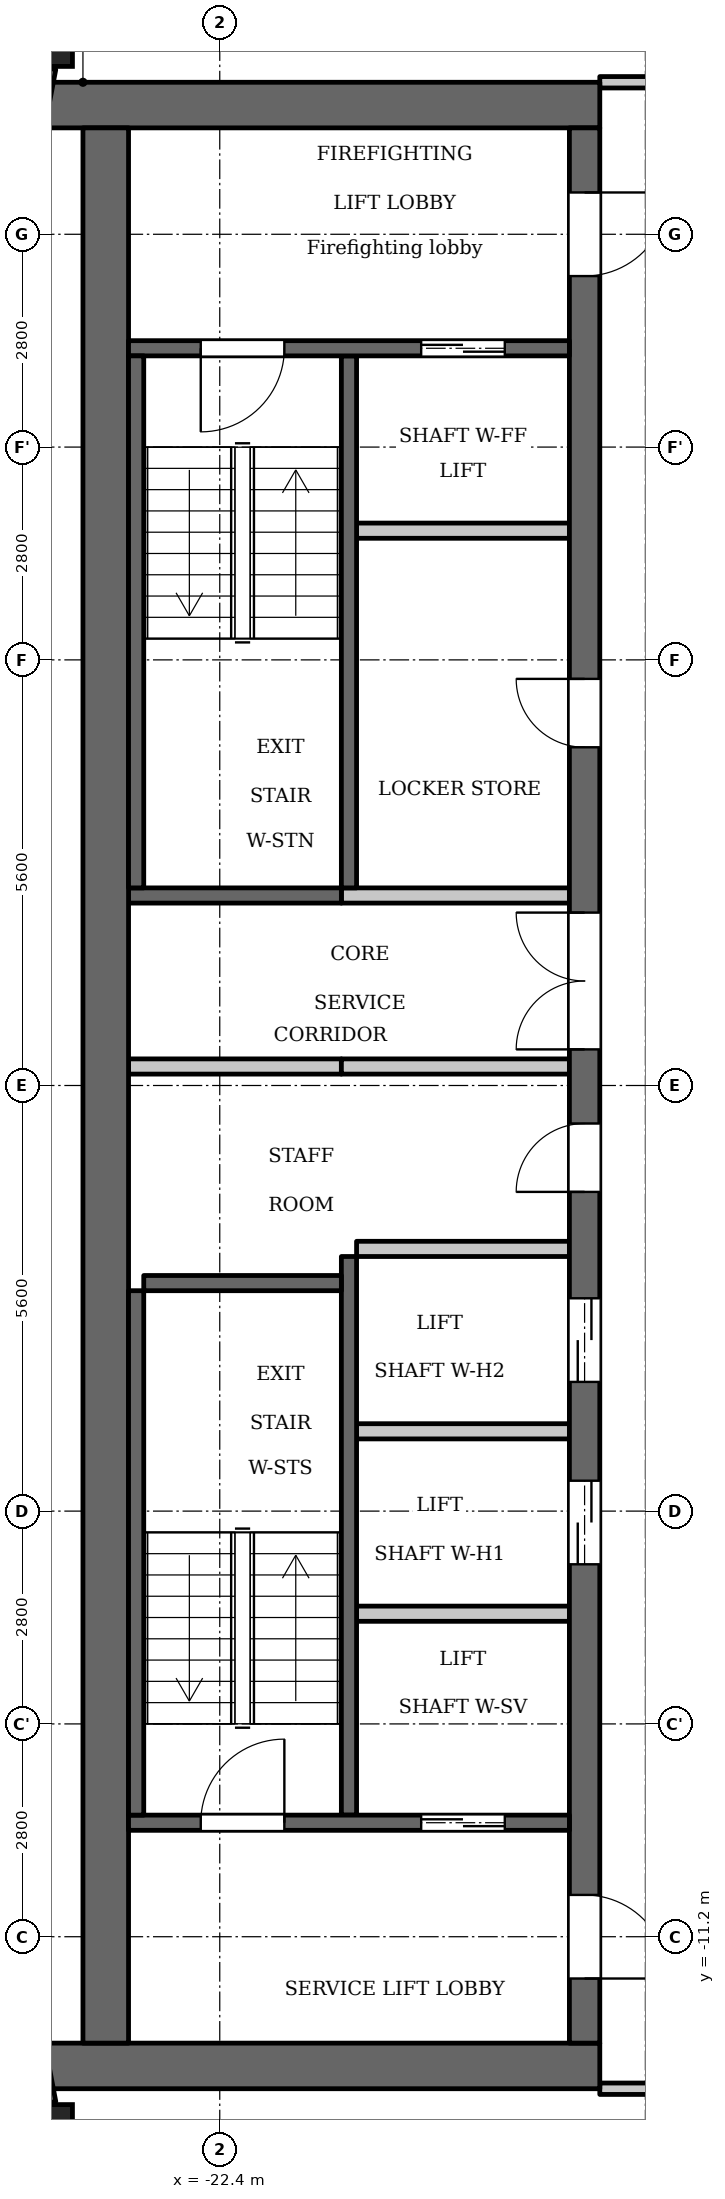
"""IFC4 building model, lengths in metres.
Left out: names, types, materials, properties, quantities, classifications, styles, units other than length and angle.
Written with IfcOpenShell. Run it as: python <this file> out.ifc"""

import sys

from ifc_helpers import new_model, si_unit, direction, frame, frame_2d, origin, origin_2d, place, context, subcontext, project, spatial, rectangle, extrude, element, fill, save


model = new_model("IFC4")
c1 = context("Model", 3, precision=1e-05, world=origin(), true_north=direction((0.0, 1.0)))
c2 = subcontext(c1, "Body", "Model", "MODEL_VIEW")
j1 = project(units=[si_unit("LENGTHUNIT", "METRE"), si_unit("PLANEANGLEUNIT", "RADIAN")], contexts=[c1])
p1 = place(None, origin())
s1 = spatial("IfcSite", under=j1, at=p1, CompositionType="ELEMENT")
p2 = place(p1, origin())
s2 = spatial("IfcBuilding", under=s1, at=p2, CompositionType="ELEMENT")
p3 = place(p2, frame((0.0, 0.0, 259.2)))
s3 = spatial("IfcBuildingStorey", under=s2, at=p3, CompositionType="ELEMENT", Elevation=259.2)
for number, where, z_axis, x_axis in (
    (1, (-24.738, 13.809, 0.0), (0.0, 0.0, 1.0), (1.0, 0.0, 0.0)),
    (2, (-24.738, -13.809, 0.0), (0.0, 0.0, 1.0), (1.0, 0.0, 0.0)),
):
    element("IfcColumn", number, at=place(p3, frame(where, z_axis=z_axis, x_axis=x_axis)), inside=s3, PredefinedType="COLUMN", context=c2, shape_type="SweptSolid", body=[
        extrude(rectangle(XDim=0.8, YDim=0.8, at=origin_2d()), origin(), (0.0, 0.0, 1.0), 3.5),
    ])
for number, where, z_axis, x_axis in (
    (3, (-24.705, 13.395, 0.0), (0.0, 0.0, 1.0), (-0.187, -0.982, 0.0)),
    (4, (-25.053, -11.572, 0.0), (0.0, 0.0, 1.0), (0.187, -0.982, 0.0)),
):
    element("IfcWall", number, at=place(p3, frame(where, z_axis=z_axis, x_axis=x_axis)), inside=s3, PredefinedType="SOLIDWALL", context=c2, shape_type="SweptSolid", body=[
        extrude(rectangle(XDim=1.856, YDim=0.3, at=frame_2d((0.928, 0.0))), origin(), (0.0, 0.0, 1.0), 2.55),
    ])
p4 = place(p3, frame((-20.7, 2.6, 0.0), z_axis=(0.0, 0.0, 1.0), x_axis=(0.0, 1.0, 0.0)))
e5 = element("IfcWall", 5, at=p4, inside=s3, PredefinedType="SHEAR", context=c2, shape_type="SweptSolid", body=[
    extrude(rectangle(XDim=7.0, YDim=0.2, at=frame_2d((3.5, 0.0))), origin(), (0.0, 0.0, 1.0), 3.2),
])
p5 = place(p3, frame((-20.7, -9.6, 0.0), z_axis=(0.0, 0.0, 1.0), x_axis=(0.0, 1.0, 0.0)))
e6 = element("IfcWall", 6, at=p5, inside=s3, PredefinedType="SHEAR", context=c2, shape_type="SweptSolid", body=[
    extrude(rectangle(XDim=7.35, YDim=0.2, at=frame_2d((3.675, 0.0))), origin(), (0.0, 0.0, 1.0), 3.2),
])
p6 = place(p3, frame((-20.8, 2.5, 0.0), z_axis=(0.0, 0.0, 1.0), x_axis=(-1.0, 0.0, 0.0)))
e7 = element("IfcWall", 7, at=p6, inside=s3, PredefinedType="SHEAR", context=c2, shape_type="SweptSolid", body=[
    extrude(rectangle(XDim=2.8, YDim=0.2, at=frame_2d((1.4, 0.0))), origin(), (0.0, 0.0, 1.0), 3.2),
])
p7 = place(p3, frame((-20.8, 0.25, 0.0), z_axis=(0.0, 0.0, 1.0), x_axis=(-1.0, 0.0, 0.0)))
e8 = element("IfcWall", 8, at=p7, inside=s3, PredefinedType="PARTITIONING", context=c2, shape_type="SweptSolid", body=[
    extrude(rectangle(XDim=2.8, YDim=0.2, at=frame_2d((1.4, 0.0))), origin(), (0.0, 0.0, 1.0), 3.2),
])
for number, where, z_axis, x_axis in (
    (9, (-17.4, 12.9, 0.0), (0.0, 0.0, 1.0), (-1.0, 0.0, 0.0)),
    (10, (-17.4, -12.9, 0.0), (0.0, 0.0, 1.0), (-1.0, 0.0, 0.0)),
):
    element("IfcWall", number, at=place(p3, frame(where, z_axis=z_axis, x_axis=x_axis)), inside=s3, PredefinedType="SHEAR", context=c2, shape_type="SweptSolid", body=[
        extrude(rectangle(XDim=7.32, YDim=0.6, at=frame_2d((3.66, 0.0))), origin(), (0.0, 0.0, 1.0), 3.2),
    ])
p8 = place(p3, frame((-17.6, -12.6, 0.0), z_axis=(0.0, 0.0, 1.0), x_axis=(0.0, 1.0, 0.0)))
e11 = element("IfcWall", 11, at=p8, inside=s3, PredefinedType="SHEAR", context=c2, shape_type="SweptSolid", body=[
    extrude(rectangle(XDim=25.2, YDim=0.4, at=frame_2d((12.6, 0.0))), origin(), (0.0, 0.0, 1.0), 3.2),
])
p9 = place(p8, frame((6.3, 0.0, 0.0)))
e12 = element("IfcOpeningElement", 12, at=p9, cuts=e11, PredefinedType="OPENING", context=c2, shape_type="SweptSolid", body=[
    extrude(rectangle(XDim=1.1, YDim=2.1, at=frame_2d((0.55, 1.05))), frame((0.0, 0.21, 0.0), z_axis=(0.0, -1.0, 0.0), x_axis=(1.0, 0.0, 0.0)), (0.0, 0.0, 1.0), 0.42),
])
p10 = place(p8, frame((8.7, 0.0, 0.0)))
e13 = element("IfcOpeningElement", 13, at=p10, cuts=e11, PredefinedType="OPENING", context=c2, shape_type="SweptSolid", body=[
    extrude(rectangle(XDim=1.1, YDim=2.1, at=frame_2d((0.55, 1.05))), frame((0.0, 0.21, 0.0), z_axis=(0.0, -1.0, 0.0), x_axis=(1.0, 0.0, 0.0)), (0.0, 0.0, 1.0), 0.42),
])
p11 = place(p8, frame((11.2, 0.0, 0.0)))
e14 = element("IfcOpeningElement", 14, at=p11, cuts=e11, PredefinedType="OPENING", context=c2, shape_type="SweptSolid", body=[
    extrude(rectangle(XDim=0.9, YDim=2.1, at=frame_2d((0.45, 1.05))), frame((0.0, 0.21, 0.0), z_axis=(0.0, -1.0, 0.0), x_axis=(1.0, 0.0, 0.0)), (0.0, 0.0, 1.0), 0.42),
])
p12 = place(p8, frame((17.05, 0.0, 0.0)))
e15 = element("IfcOpeningElement", 15, at=p12, cuts=e11, PredefinedType="OPENING", context=c2, shape_type="SweptSolid", body=[
    extrude(rectangle(XDim=0.9, YDim=2.1, at=frame_2d((0.45, 1.05))), frame((0.0, 0.21, 0.0), z_axis=(0.0, -1.0, 0.0), x_axis=(1.0, 0.0, 0.0)), (0.0, 0.0, 1.0), 0.42),
])
p13 = place(p8, frame((23.25, 0.0, 0.0)))
e16 = element("IfcOpeningElement", 16, at=p13, cuts=e11, PredefinedType="OPENING", context=c2, shape_type="SweptSolid", body=[
    extrude(rectangle(XDim=1.1, YDim=2.1, at=frame_2d((0.55, 1.05))), frame((0.0, 0.21, 0.0), z_axis=(0.0, -1.0, 0.0), x_axis=(1.0, 0.0, 0.0)), (0.0, 0.0, 1.0), 0.42),
])
p14 = place(p8, frame((0.85, 0.0, 0.0)))
e17 = element("IfcOpeningElement", 17, at=p14, cuts=e11, PredefinedType="OPENING", context=c2, shape_type="SweptSolid", body=[
    extrude(rectangle(XDim=1.1, YDim=2.1, at=frame_2d((0.55, 1.05))), frame((0.0, 0.21, 0.0), z_axis=(0.0, -1.0, 0.0), x_axis=(1.0, 0.0, 0.0)), (0.0, 0.0, 1.0), 0.42),
])
p15 = place(p8, frame((13.075, 0.0, 0.0)))
e18 = element("IfcOpeningElement", 18, at=p15, cuts=e11, PredefinedType="OPENING", context=c2, shape_type="SweptSolid", body=[
    extrude(rectangle(XDim=1.8, YDim=2.1, at=frame_2d((0.9, 1.05))), frame((0.0, 0.21, 0.0), z_axis=(0.0, -1.0, 0.0), x_axis=(1.0, 0.0, 0.0)), (0.0, 0.0, 1.0), 0.42),
])
p16 = place(p3, frame((-23.9, -12.6, 0.0), z_axis=(0.0, 0.0, 1.0), x_axis=(0.0, 1.0, 0.0)))
e19 = element("IfcWall", 19, at=p16, inside=s3, PredefinedType="SHEAR", context=c2, shape_type="SweptSolid", body=[
    extrude(rectangle(XDim=25.2, YDim=0.6, at=frame_2d((12.6, 0.0))), origin(), (0.0, 0.0, 1.0), 3.2),
])
p17 = place(p3, frame((-17.8, -9.7, 0.0), z_axis=(0.0, 0.0, 1.0), x_axis=(-1.0, 0.0, 0.0)))
e20 = element("IfcWall", 20, at=p17, inside=s3, PredefinedType="SHEAR", context=c2, shape_type="SweptSolid", body=[
    extrude(rectangle(XDim=5.8, YDim=0.2, at=frame_2d((2.9, 0.0))), origin(), (0.0, 0.0, 1.0), 3.2),
])
p18 = place(p17, frame((0.85, 0.0, 0.0)))
e21 = element("IfcOpeningElement", 21, at=p18, cuts=e20, PredefinedType="OPENING", context=c2, shape_type="SweptSolid", body=[
    extrude(rectangle(XDim=1.1, YDim=2.1, at=frame_2d((0.55, 1.05))), frame((0.0, 0.11, 0.0), z_axis=(0.0, -1.0, 0.0), x_axis=(1.0, 0.0, 0.0)), (0.0, 0.0, 1.0), 0.22),
])
p19 = place(p17, frame((3.75, 0.0, 0.0)))
e22 = element("IfcOpeningElement", 22, at=p19, cuts=e20, PredefinedType="OPENING", context=c2, shape_type="SweptSolid", body=[
    extrude(rectangle(XDim=1.1, YDim=2.1, at=frame_2d((0.55, 1.05))), frame((0.0, 0.11, 0.0), z_axis=(0.0, -1.0, 0.0), x_axis=(1.0, 0.0, 0.0)), (0.0, 0.0, 1.0), 0.22),
])
for number, where, z_axis, x_axis in (
    (23, (-17.8, -6.95, 0.0), (0.0, 0.0, 1.0), (-1.0, 0.0, 0.0)),
    (24, (-17.8, -4.55, 0.0), (0.0, 0.0, 1.0), (-1.0, 0.0, 0.0)),
    (25, (-17.8, -2.15, 0.0), (0.0, 0.0, 1.0), (-1.0, 0.0, 0.0)),
):
    element("IfcWall", number, at=place(p3, frame(where, z_axis=z_axis, x_axis=x_axis)), inside=s3, PredefinedType="PARTITIONING", context=c2, shape_type="SweptSolid", body=[
        extrude(rectangle(XDim=2.8, YDim=0.2, at=frame_2d((1.4, 0.0))), origin(), (0.0, 0.0, 1.0), 3.2),
    ])
for number, where, z_axis, x_axis in (
    (26, (-17.8, 0.25, 0.0), (0.0, 0.0, 1.0), (-1.0, 0.0, 0.0)),
    (27, (-17.8, 2.5, 0.0), (0.0, 0.0, 1.0), (-1.0, 0.0, 0.0)),
):
    element("IfcWall", number, at=place(p3, frame(where, z_axis=z_axis, x_axis=x_axis)), inside=s3, PredefinedType="PARTITIONING", context=c2, shape_type="SweptSolid", body=[
        extrude(rectangle(XDim=3.0, YDim=0.2, at=frame_2d((1.5, 0.0))), origin(), (0.0, 0.0, 1.0), 3.2),
    ])
p20 = place(p3, frame((-17.8, 7.3, 0.0), z_axis=(0.0, 0.0, 1.0), x_axis=(-1.0, 0.0, 0.0)))
e28 = element("IfcWall", 28, at=p20, inside=s3, PredefinedType="PARTITIONING", context=c2, shape_type="SweptSolid", body=[
    extrude(rectangle(XDim=2.8, YDim=0.2, at=frame_2d((1.4, 0.0))), origin(), (0.0, 0.0, 1.0), 3.2),
])
p21 = place(p3, frame((-17.8, 9.7, 0.0), z_axis=(0.0, 0.0, 1.0), x_axis=(-1.0, 0.0, 0.0)))
e29 = element("IfcWall", 29, at=p21, inside=s3, PredefinedType="SHEAR", context=c2, shape_type="SweptSolid", body=[
    extrude(rectangle(XDim=5.8, YDim=0.2, at=frame_2d((2.9, 0.0))), origin(), (0.0, 0.0, 1.0), 3.2),
])
p22 = place(p21, frame((0.85, 0.0, 0.0)))
e30 = element("IfcOpeningElement", 30, at=p22, cuts=e29, PredefinedType="OPENING", context=c2, shape_type="SweptSolid", body=[
    extrude(rectangle(XDim=1.1, YDim=2.1, at=frame_2d((0.55, 1.05))), frame((0.0, 0.11, 0.0), z_axis=(0.0, -1.0, 0.0), x_axis=(1.0, 0.0, 0.0)), (0.0, 0.0, 1.0), 0.22),
])
p23 = place(p21, frame((3.75, 0.0, 0.0)))
e31 = element("IfcOpeningElement", 31, at=p23, cuts=e29, PredefinedType="OPENING", context=c2, shape_type="SweptSolid", body=[
    extrude(rectangle(XDim=1.1, YDim=2.1, at=frame_2d((0.55, 1.05))), frame((0.0, 0.11, 0.0), z_axis=(0.0, -1.0, 0.0), x_axis=(1.0, 0.0, 0.0)), (0.0, 0.0, 1.0), 0.22),
])
p24 = place(p3, frame((-23.5, 2.6, 0.0), z_axis=(0.0, 0.0, 1.0), x_axis=(0.0, 1.0, 0.0)))
e32 = element("IfcWall", 32, at=p24, inside=s3, PredefinedType="SHEAR", context=c2, shape_type="SweptSolid", body=[
    extrude(rectangle(XDim=7.0, YDim=0.2, at=frame_2d((3.5, 0.0))), origin(), (0.0, 0.0, 1.0), 3.2),
])
p25 = place(p3, frame((-23.5, -9.6, 0.0), z_axis=(0.0, 0.0, 1.0), x_axis=(0.0, 1.0, 0.0)))
e33 = element("IfcWall", 33, at=p25, inside=s3, PredefinedType="SHEAR", context=c2, shape_type="SweptSolid", body=[
    extrude(rectangle(XDim=6.9, YDim=0.2, at=frame_2d((3.45, 0.0))), origin(), (0.0, 0.0, 1.0), 3.2),
])
p26 = place(p3, frame((-20.8, -2.6, 0.0), z_axis=(0.0, 0.0, 1.0), x_axis=(-1.0, 0.0, 0.0)))
e34 = element("IfcWall", 34, at=p26, inside=s3, PredefinedType="SHEAR", context=c2, shape_type="SweptSolid", body=[
    extrude(rectangle(XDim=2.6, YDim=0.2, at=frame_2d((1.3, 0.0))), origin(), (0.0, 0.0, 1.0), 3.2),
])
p27 = place(p3, frame((-17.4, -13.2, 0.0), z_axis=(0.0, 0.0, 1.0), x_axis=(1.0, 0.0, 0.0)))
e35 = element("IfcWall", 35, at=p27, inside=s3, PredefinedType="PARTITIONING", context=c2, shape_type="SweptSolid", body=[
    extrude(rectangle(XDim=2.325, YDim=0.15, at=frame_2d((1.163, 0.0))), origin(), (0.0, 0.0, 1.0), 3.2),
])
p28 = place(p27, frame((0.65, 0.0, 0.0)))
e36 = element("IfcOpeningElement", 36, at=p28, cuts=e35, PredefinedType="OPENING", context=c2, shape_type="SweptSolid", body=[
    extrude(rectangle(XDim=1.0, YDim=2.1, at=frame_2d((0.5, 1.05))), frame((0.0, 0.085, 0.0), z_axis=(0.0, -1.0, 0.0), x_axis=(1.0, 0.0, 0.0)), (0.0, 0.0, 1.0), 0.17),
])
p29 = place(p3, frame((-17.4, 13.2, 0.0), z_axis=(0.0, 0.0, 1.0), x_axis=(1.0, 0.0, 0.0)))
e37 = element("IfcWall", 37, at=p29, inside=s3, PredefinedType="PARTITIONING", context=c2, shape_type="SweptSolid", body=[
    extrude(rectangle(XDim=2.325, YDim=0.15, at=frame_2d((1.163, 0.0))), origin(), (0.0, 0.0, 1.0), 3.2),
])
p30 = place(p29, frame((0.75, 0.0, 0.0)))
e38 = element("IfcOpeningElement", 38, at=p30, cuts=e37, PredefinedType="OPENING", context=c2, shape_type="SweptSolid", body=[
    extrude(rectangle(XDim=1.0, YDim=2.1, at=frame_2d((0.5, 1.05))), frame((0.0, 0.085, 0.0), z_axis=(0.0, -1.0, 0.0), x_axis=(1.0, 0.0, 0.0)), (0.0, 0.0, 1.0), 0.17),
])
p31 = place(p18, origin())
e39 = element("IfcDoor", 39, at=p31, inside=s3, OperationType="DOUBLE_DOOR_SLIDING", PredefinedType="DOOR", context=c2, shape_type="SweptSolid", body=[
    extrude(rectangle(XDim=1.1, YDim=2.1, at=frame_2d((0.55, 1.05))), frame((0.0, 0.025, 0.0), z_axis=(0.0, -1.0, 0.0), x_axis=(1.0, 0.0, 0.0)), (0.0, 0.0, 1.0), 0.05),
])
fill(e21, e39)
p32 = place(p9, origin())
e40 = element("IfcDoor", 40, at=p32, inside=s3, OperationType="DOUBLE_DOOR_SLIDING", PredefinedType="DOOR", context=c2, shape_type="SweptSolid", body=[
    extrude(rectangle(XDim=1.1, YDim=2.1, at=frame_2d((0.55, 1.05))), frame((0.0, 0.025, 0.0), z_axis=(0.0, -1.0, 0.0), x_axis=(1.0, 0.0, 0.0)), (0.0, 0.0, 1.0), 0.05),
])
fill(e12, e40)
p33 = place(p10, origin())
e41 = element("IfcDoor", 41, at=p33, inside=s3, OperationType="DOUBLE_DOOR_SLIDING", PredefinedType="DOOR", context=c2, shape_type="SweptSolid", body=[
    extrude(rectangle(XDim=1.1, YDim=2.1, at=frame_2d((0.55, 1.05))), frame((0.0, 0.025, 0.0), z_axis=(0.0, -1.0, 0.0), x_axis=(1.0, 0.0, 0.0)), (0.0, 0.0, 1.0), 0.05),
])
fill(e13, e41)
p34 = place(p11, origin())
e42 = element("IfcDoor", 42, at=p34, inside=s3, OperationType="SINGLE_SWING_RIGHT", PredefinedType="DOOR", context=c2, shape_type="SweptSolid", body=[
    extrude(rectangle(XDim=0.9, YDim=2.1, at=frame_2d((0.45, 1.05))), frame((0.0, 0.025, 0.0), z_axis=(0.0, -1.0, 0.0), x_axis=(1.0, 0.0, 0.0)), (0.0, 0.0, 1.0), 0.05),
])
fill(e14, e42)
p35 = place(p12, origin())
e43 = element("IfcDoor", 43, at=p35, inside=s3, OperationType="SINGLE_SWING_LEFT", PredefinedType="DOOR", context=c2, shape_type="SweptSolid", body=[
    extrude(rectangle(XDim=0.9, YDim=2.1, at=frame_2d((0.45, 1.05))), frame((0.0, 0.025, 0.0), z_axis=(0.0, -1.0, 0.0), x_axis=(1.0, 0.0, 0.0)), (0.0, 0.0, 1.0), 0.05),
])
fill(e15, e43)
p36 = place(p22, origin())
e44 = element("IfcDoor", 44, at=p36, inside=s3, OperationType="DOUBLE_DOOR_SLIDING", PredefinedType="DOOR", context=c2, shape_type="SweptSolid", body=[
    extrude(rectangle(XDim=1.1, YDim=2.1, at=frame_2d((0.55, 1.05))), frame((0.0, 0.025, 0.0), z_axis=(0.0, -1.0, 0.0), x_axis=(1.0, 0.0, 0.0)), (0.0, 0.0, 1.0), 0.05),
])
fill(e30, e44)
p37 = place(p13, origin())
e45 = element("IfcDoor", 45, at=p37, inside=s3, OperationType="SINGLE_SWING_RIGHT", PredefinedType="DOOR", context=c2, shape_type="SweptSolid", body=[
    extrude(rectangle(XDim=1.1, YDim=2.1, at=frame_2d((0.55, 1.05))), frame((0.0, 0.025, 0.0), z_axis=(0.0, -1.0, 0.0), x_axis=(1.0, 0.0, 0.0)), (0.0, 0.0, 1.0), 0.05),
])
fill(e16, e45)
p38 = place(p14, origin())
e46 = element("IfcDoor", 46, at=p38, inside=s3, OperationType="SINGLE_SWING_LEFT", PredefinedType="DOOR", context=c2, shape_type="SweptSolid", body=[
    extrude(rectangle(XDim=1.1, YDim=2.1, at=frame_2d((0.55, 1.05))), frame((0.0, 0.025, 0.0), z_axis=(0.0, -1.0, 0.0), x_axis=(1.0, 0.0, 0.0)), (0.0, 0.0, 1.0), 0.05),
])
fill(e17, e46)
p39 = place(p23, origin())
e47 = element("IfcDoor", 47, at=p39, inside=s3, OperationType="SINGLE_SWING_LEFT", PredefinedType="DOOR", context=c2, shape_type="SweptSolid", body=[
    extrude(rectangle(XDim=1.1, YDim=2.1, at=frame_2d((0.55, 1.05))), frame((0.0, 0.025, 0.0), z_axis=(0.0, -1.0, 0.0), x_axis=(1.0, 0.0, 0.0)), (0.0, 0.0, 1.0), 0.05),
])
fill(e31, e47)
p40 = place(p19, origin())
e48 = element("IfcDoor", 48, at=p40, inside=s3, OperationType="SINGLE_SWING_LEFT", PredefinedType="DOOR", context=c2, shape_type="SweptSolid", body=[
    extrude(rectangle(XDim=1.1, YDim=2.1, at=frame_2d((0.55, 1.05))), frame((0.0, 0.025, 0.0), z_axis=(0.0, -1.0, 0.0), x_axis=(1.0, 0.0, 0.0)), (0.0, 0.0, 1.0), 0.05),
])
fill(e22, e48)
p41 = place(p15, origin())
e49 = element("IfcDoor", 49, at=p41, inside=s3, OperationType="DOUBLE_DOOR_SINGLE_SWING", PredefinedType="DOOR", context=c2, shape_type="SweptSolid", body=[
    extrude(rectangle(XDim=1.8, YDim=2.1, at=frame_2d((0.9, 1.05))), frame((0.0, 0.025, 0.0), z_axis=(0.0, -1.0, 0.0), x_axis=(1.0, 0.0, 0.0)), (0.0, 0.0, 1.0), 0.05),
])
fill(e18, e49)
save(model, sys.argv[1])
